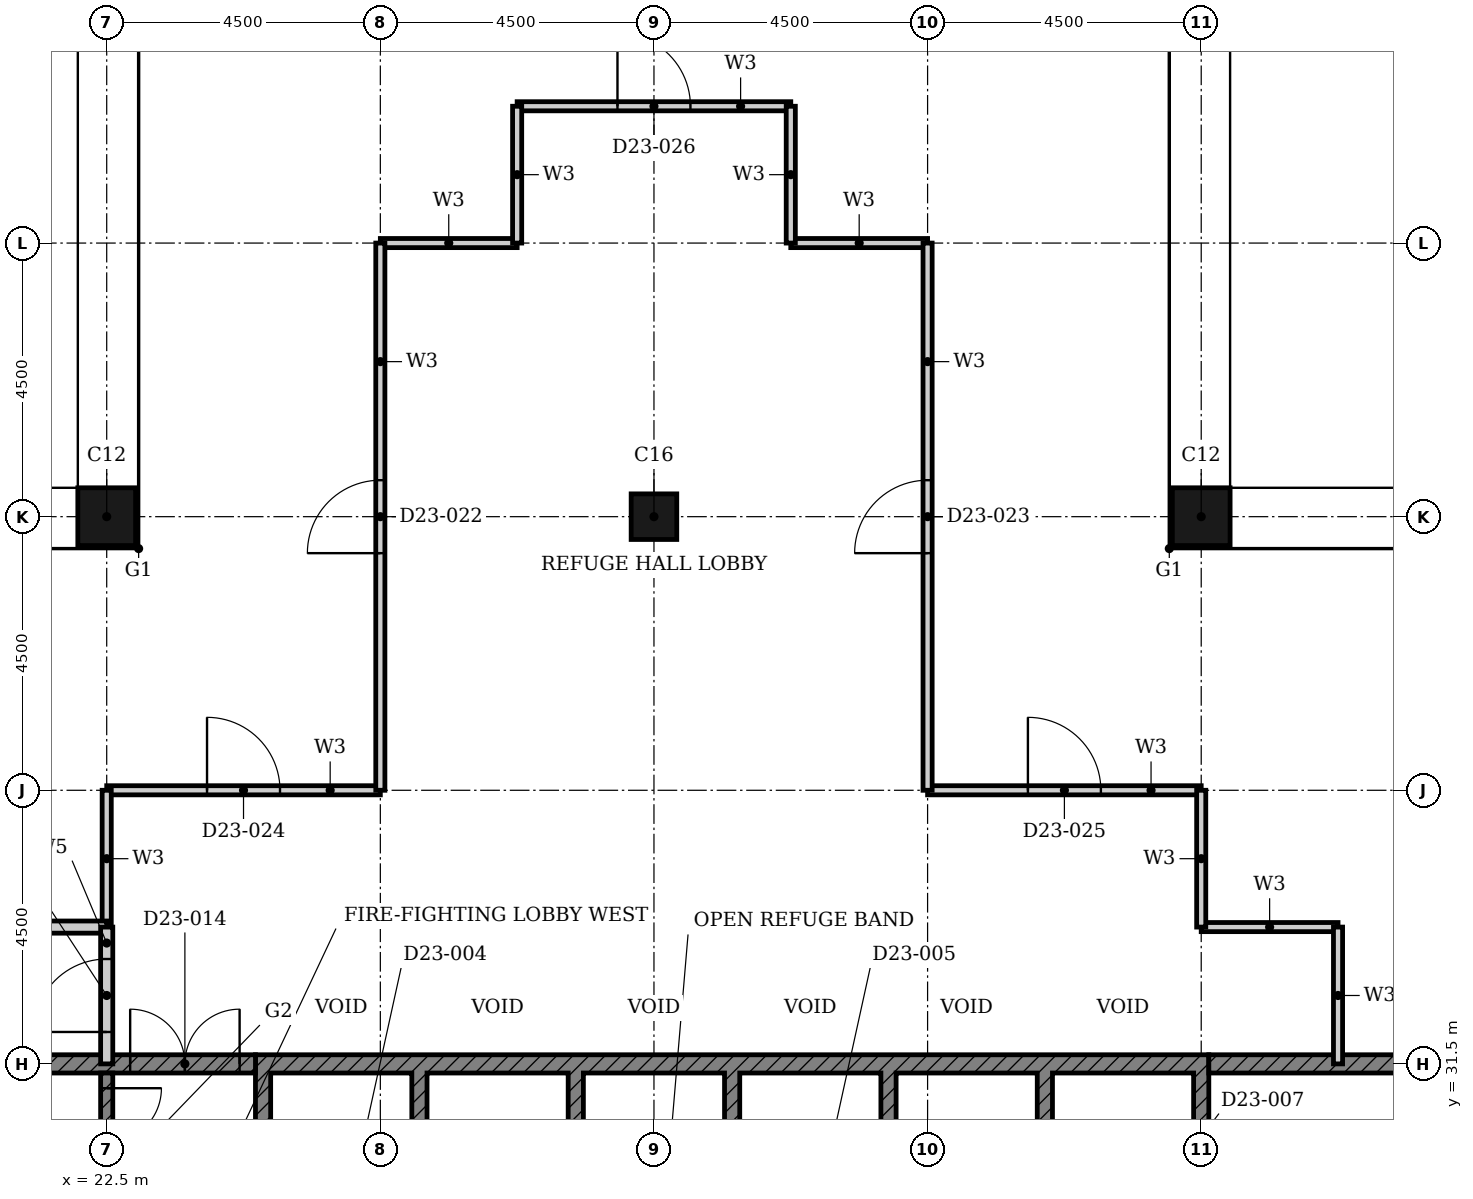
"""IFC4 building model, lengths in metres.
Left out: names, types, materials, properties, quantities, classifications, styles, units other than length and angle.
Written with IfcOpenShell. Run it as: python <this file> out.ifc"""

import sys

from ifc_helpers import new_model, si_unit, direction, frame, frame_2d, origin, origin_2d, place, context, subcontext, project, spatial, polyline, rectangle, hollow_rectangle, outline, extrude, element, fill, save


model = new_model("IFC4")
c1 = context("Model", 3, precision=1e-05, world=origin(), true_north=direction((0.0, 1.0)))
c2 = subcontext(c1, "Body", "Model", "MODEL_VIEW")
j1 = project(units=[si_unit("LENGTHUNIT", "METRE"), si_unit("PLANEANGLEUNIT", "RADIAN")], contexts=[c1])
p1 = place(None, origin())
s1 = spatial("IfcSite", under=j1, at=p1, CompositionType="ELEMENT")
p2 = place(p1, origin())
s2 = spatial("IfcBuilding", under=s1, at=p2, CompositionType="ELEMENT")
p3 = place(p2, frame((0.0, 0.0, 96.0)))
s3 = spatial("IfcBuildingStorey", under=s2, at=p3, CompositionType="ELEMENT", Elevation=96.0)
for number, where, z_axis, x_axis in (
    (1, (40.5, 40.5, 0.0), (0.0, 0.0, 1.0), (1.0, 0.0, 0.0)),
    (2, (22.5, 40.5, 0.0), (0.0, 0.0, 1.0), (1.0, 0.0, 0.0)),
):
    element("IfcColumn", number, at=place(p3, frame(where, z_axis=z_axis, x_axis=x_axis)), inside=s3, PredefinedType="COLUMN", context=c2, shape_type="SweptSolid", body=[
        extrude(hollow_rectangle(XDim=0.95, YDim=0.95, WallThickness=0.03, at=origin_2d()), origin(), (0.0, 0.0, 1.0), 4.8),
    ])
p4 = place(p3, frame((31.5, 40.5, 0.0), z_axis=(0.0, 0.0, 1.0), x_axis=(1.0, 0.0, 0.0)))
e3 = element("IfcColumn", 3, at=p4, inside=s3, PredefinedType="COLUMN", context=c2, shape_type="SweptSolid", body=[
    extrude(hollow_rectangle(XDim=0.75, YDim=0.75, WallThickness=0.024, at=origin_2d()), origin(), (0.0, 0.0, 1.0), 4.8),
])
p5 = place(p3, origin())
e4 = element("IfcWall", 4, at=p5, inside=s3, PredefinedType="SHEAR", context=c2, shape_type="SweptSolid", body=[
    extrude(outline(polyline([(24.947, 28.725), (25.197, 28.725), (25.197, 31.35), (27.518, 31.35), (27.518, 28.725), (27.768, 28.725), (27.768, 31.35), (30.089, 31.35), (30.089, 28.725), (30.339, 28.725), (30.339, 31.35), (32.661, 31.35), (32.661, 28.725), (32.911, 28.725), (32.911, 31.35), (35.232, 31.35), (35.232, 28.725), (35.482, 28.725), (35.482, 31.35), (37.803, 31.35), (37.803, 28.725), (38.053, 28.725), (38.053, 31.35), (40.375, 31.35), (40.375, 28.725), (40.625, 28.725), (40.625, 31.65), (24.947, 31.65), (24.947, 28.725)])), origin(), (0.0, 0.0, 1.0), 4.5),
])
p6 = place(p3, frame((18.15, 31.5, 0.0), z_axis=(0.0, 0.0, 1.0), x_axis=(1.0, 0.0, 0.0)))
e5 = element("IfcWall", 5, at=p6, inside=s3, PredefinedType="SHEAR", context=c2, shape_type="SweptSolid", body=[
    extrude(rectangle(XDim=6.797, YDim=0.3, at=frame_2d((3.398, 0.0))), origin(), (0.0, 0.0, 1.0), 4.5),
])
p7 = place(p6, frame((4.736, 0.0, 0.0)))
e6 = element("IfcOpeningElement", 6, at=p7, cuts=e5, PredefinedType="OPENING", context=c2, shape_type="SweptSolid", body=[
    extrude(rectangle(XDim=1.8, YDim=2.1, at=frame_2d((0.9, 1.05))), frame((0.0, 0.16, 0.0), z_axis=(0.0, -1.0, 0.0), x_axis=(1.0, 0.0, 0.0)), (0.0, 0.0, 1.0), 0.32),
])
p8 = place(p3, frame((40.625, 31.5, 0.0), z_axis=(0.0, 0.0, 1.0), x_axis=(1.0, 0.0, 0.0)))
e7 = element("IfcWall", 7, at=p8, inside=s3, PredefinedType="SHEAR", context=c2, shape_type="SweptSolid", body=[
    extrude(rectangle(XDim=4.225, YDim=0.3, at=frame_2d((2.113, 0.0))), origin(), (0.0, 0.0, 1.0), 4.5),
])
p9 = place(p3, frame((22.5, 31.35, 0.0), z_axis=(0.0, 0.0, 1.0), x_axis=(0.0, -1.0, 0.0)))
e8 = element("IfcWall", 8, at=p9, inside=s3, PredefinedType="SHEAR", context=c2, shape_type="SweptSolid", body=[
    extrude(rectangle(XDim=5.825, YDim=0.2, at=frame_2d((2.913, 0.0))), origin(), (0.0, 0.0, 1.0), 4.5),
])
p10 = place(p9, frame((0.25, 0.0, 0.0)))
e9 = element("IfcOpeningElement", 9, at=p10, cuts=e8, PredefinedType="OPENING", context=c2, shape_type="SweptSolid", body=[
    extrude(rectangle(XDim=1.8, YDim=2.1, at=frame_2d((0.9, 1.05))), frame((0.0, 0.11, 0.0), z_axis=(0.0, -1.0, 0.0), x_axis=(1.0, 0.0, 0.0)), (0.0, 0.0, 1.0), 0.22),
])
p11 = place(p3, frame((40.5, 33.75, 0.0), z_axis=(0.0, 0.0, 1.0), x_axis=(1.0, 0.0, 0.0)))
e10 = element("IfcWall", 10, at=p11, inside=s3, PredefinedType="PARTITIONING", context=c2, shape_type="SweptSolid", body=[
    extrude(rectangle(XDim=2.25, YDim=0.15, at=frame_2d((1.125, 0.0))), origin(), (0.0, 0.0, 1.0), 4.5),
])
p12 = place(p3, frame((22.5, 36.0, 0.0), z_axis=(0.0, 0.0, 1.0), x_axis=(1.0, 0.0, 0.0)))
e11 = element("IfcWall", 11, at=p12, inside=s3, PredefinedType="PARTITIONING", context=c2, shape_type="SweptSolid", body=[
    extrude(rectangle(XDim=4.5, YDim=0.15, at=frame_2d((2.25, 0.0))), origin(), (0.0, 0.0, 1.0), 4.5),
])
p13 = place(p12, frame((1.65, 0.0, 0.0)))
e12 = element("IfcOpeningElement", 12, at=p13, cuts=e11, PredefinedType="OPENING", context=c2, shape_type="SweptSolid", body=[
    extrude(rectangle(XDim=1.2, YDim=2.1, at=frame_2d((0.6, 1.05))), frame((0.0, 0.085, 0.0), z_axis=(0.0, -1.0, 0.0), x_axis=(1.0, 0.0, 0.0)), (0.0, 0.0, 1.0), 0.17),
])
p14 = place(p3, frame((36.0, 36.0, 0.0), z_axis=(0.0, 0.0, 1.0), x_axis=(1.0, 0.0, 0.0)))
e13 = element("IfcWall", 13, at=p14, inside=s3, PredefinedType="PARTITIONING", context=c2, shape_type="SweptSolid", body=[
    extrude(rectangle(XDim=4.5, YDim=0.15, at=frame_2d((2.25, 0.0))), origin(), (0.0, 0.0, 1.0), 4.5),
])
p15 = place(p14, frame((1.65, 0.0, 0.0)))
e14 = element("IfcOpeningElement", 14, at=p15, cuts=e13, PredefinedType="OPENING", context=c2, shape_type="SweptSolid", body=[
    extrude(rectangle(XDim=1.2, YDim=2.1, at=frame_2d((0.6, 1.05))), frame((0.0, 0.085, 0.0), z_axis=(0.0, -1.0, 0.0), x_axis=(1.0, 0.0, 0.0)), (0.0, 0.0, 1.0), 0.17),
])
for number, where, z_axis, x_axis in (
    (15, (27.0, 45.0, 0.0), (0.0, 0.0, 1.0), (1.0, 0.0, 0.0)),
    (16, (33.75, 45.0, 0.0), (0.0, 0.0, 1.0), (1.0, 0.0, 0.0)),
):
    element("IfcWall", number, at=place(p3, frame(where, z_axis=z_axis, x_axis=x_axis)), inside=s3, PredefinedType="PARTITIONING", context=c2, shape_type="SweptSolid", body=[
        extrude(rectangle(XDim=2.25, YDim=0.15, at=frame_2d((1.125, 0.0))), origin(), (0.0, 0.0, 1.0), 4.5),
    ])
p16 = place(p3, frame((29.25, 47.25, 0.0), z_axis=(0.0, 0.0, 1.0), x_axis=(1.0, 0.0, 0.0)))
e17 = element("IfcWall", 17, at=p16, inside=s3, PredefinedType="PARTITIONING", context=c2, shape_type="SweptSolid", body=[
    extrude(rectangle(XDim=4.5, YDim=0.15, at=frame_2d((2.25, 0.0))), origin(), (0.0, 0.0, 1.0), 4.5),
])
p17 = place(p16, frame((1.65, 0.0, 0.0)))
e18 = element("IfcOpeningElement", 18, at=p17, cuts=e17, PredefinedType="OPENING", context=c2, shape_type="SweptSolid", body=[
    extrude(rectangle(XDim=1.2, YDim=2.1, at=frame_2d((0.6, 1.05))), frame((0.0, 0.085, 0.0), z_axis=(0.0, -1.0, 0.0), x_axis=(1.0, 0.0, 0.0)), (0.0, 0.0, 1.0), 0.17),
])
p18 = place(p3, frame((22.5, 33.75, 0.0), z_axis=(0.0, 0.0, 1.0), x_axis=(0.0, 1.0, 0.0)))
e19 = element("IfcWall", 19, at=p18, inside=s3, PredefinedType="PARTITIONING", context=c2, shape_type="SweptSolid", body=[
    extrude(rectangle(XDim=2.25, YDim=0.15, at=frame_2d((1.125, 0.0))), origin(), (0.0, 0.0, 1.0), 4.5),
])
p19 = place(p3, frame((27.0, 36.0, 0.0), z_axis=(0.0, 0.0, 1.0), x_axis=(0.0, 1.0, 0.0)))
e20 = element("IfcWall", 20, at=p19, inside=s3, PredefinedType="PARTITIONING", context=c2, shape_type="SweptSolid", body=[
    extrude(rectangle(XDim=9.0, YDim=0.15, at=frame_2d((4.5, 0.0))), origin(), (0.0, 0.0, 1.0), 3.78),
])
p20 = place(p19, frame((3.9, 0.0, 0.0)))
e21 = element("IfcOpeningElement", 21, at=p20, cuts=e20, PredefinedType="OPENING", context=c2, shape_type="SweptSolid", body=[
    extrude(rectangle(XDim=1.2, YDim=2.1, at=frame_2d((0.6, 1.05))), frame((0.0, 0.085, 0.0), z_axis=(0.0, -1.0, 0.0), x_axis=(1.0, 0.0, 0.0)), (0.0, 0.0, 1.0), 0.17),
])
for number, where, z_axis, x_axis in (
    (22, (29.25, 45.0, 0.0), (0.0, 0.0, 1.0), (0.0, 1.0, 0.0)),
    (23, (33.75, 45.0, 0.0), (0.0, 0.0, 1.0), (0.0, 1.0, 0.0)),
):
    element("IfcWall", number, at=place(p3, frame(where, z_axis=z_axis, x_axis=x_axis)), inside=s3, PredefinedType="PARTITIONING", context=c2, shape_type="SweptSolid", body=[
        extrude(rectangle(XDim=2.25, YDim=0.15, at=frame_2d((1.125, 0.0))), origin(), (0.0, 0.0, 1.0), 4.5),
    ])
p21 = place(p3, frame((36.0, 36.0, 0.0), z_axis=(0.0, 0.0, 1.0), x_axis=(0.0, 1.0, 0.0)))
e24 = element("IfcWall", 24, at=p21, inside=s3, PredefinedType="PARTITIONING", context=c2, shape_type="SweptSolid", body=[
    extrude(rectangle(XDim=9.0, YDim=0.15, at=frame_2d((4.5, 0.0))), origin(), (0.0, 0.0, 1.0), 3.78),
])
p22 = place(p21, frame((3.9, 0.0, 0.0)))
e25 = element("IfcOpeningElement", 25, at=p22, cuts=e24, PredefinedType="OPENING", context=c2, shape_type="SweptSolid", body=[
    extrude(rectangle(XDim=1.2, YDim=2.1, at=frame_2d((0.6, 1.05))), frame((0.0, 0.085, 0.0), z_axis=(0.0, -1.0, 0.0), x_axis=(1.0, 0.0, 0.0)), (0.0, 0.0, 1.0), 0.17),
])
for number, where, z_axis, x_axis in (
    (26, (40.5, 33.75, 0.0), (0.0, 0.0, 1.0), (0.0, 1.0, 0.0)),
    (27, (42.75, 31.5, 0.0), (0.0, 0.0, 1.0), (0.0, 1.0, 0.0)),
):
    element("IfcWall", number, at=place(p3, frame(where, z_axis=z_axis, x_axis=x_axis)), inside=s3, PredefinedType="PARTITIONING", context=c2, shape_type="SweptSolid", body=[
        extrude(rectangle(XDim=2.25, YDim=0.15, at=frame_2d((1.125, 0.0))), origin(), (0.0, 0.0, 1.0), 4.5),
    ])
p23 = place(p3, frame((20.25, 33.75, 0.0), z_axis=(0.0, 0.0, 1.0), x_axis=(1.0, 0.0, 0.0)))
e28 = element("IfcWall", 28, at=p23, inside=s3, PredefinedType="PARTITIONING", context=c2, shape_type="SweptSolid", body=[
    extrude(rectangle(XDim=2.25, YDim=0.2, at=frame_2d((1.125, 0.0))), origin(), (0.0, 0.0, 1.0), 4.5),
])
p24 = place(p3, frame((22.5, 31.5, 0.0), z_axis=(0.0, 0.0, 1.0), x_axis=(0.0, 1.0, 0.0)))
e29 = element("IfcWall", 29, at=p24, inside=s3, PredefinedType="PARTITIONING", context=c2, shape_type="SweptSolid", body=[
    extrude(rectangle(XDim=2.25, YDim=0.2, at=frame_2d((1.125, 0.0))), origin(), (0.0, 0.0, 1.0), 4.5),
])
p25 = place(p24, frame((0.525, 0.0, 0.0)))
e30 = element("IfcOpeningElement", 30, at=p25, cuts=e29, PredefinedType="OPENING", context=c2, shape_type="SweptSolid", body=[
    extrude(rectangle(XDim=1.2, YDim=2.1, at=frame_2d((0.6, 1.05))), frame((0.0, 0.11, 0.0), z_axis=(0.0, -1.0, 0.0), x_axis=(1.0, 0.0, 0.0)), (0.0, 0.0, 1.0), 0.22),
])
p26 = place(p10, origin())
e31 = element("IfcDoor", 31, at=p26, inside=s3, OperationType="DOUBLE_DOOR_SINGLE_SWING", PredefinedType="DOOR", context=c2, shape_type="SweptSolid", body=[
    extrude(rectangle(XDim=1.8, YDim=2.1, at=frame_2d((0.9, 1.05))), frame((0.0, 0.025, 0.0), z_axis=(0.0, -1.0, 0.0), x_axis=(1.0, 0.0, 0.0)), (0.0, 0.0, 1.0), 0.05),
])
fill(e9, e31)
p27 = place(p7, origin())
e32 = element("IfcDoor", 32, at=p27, inside=s3, OperationType="DOUBLE_DOOR_SINGLE_SWING", PredefinedType="DOOR", context=c2, shape_type="SweptSolid", body=[
    extrude(rectangle(XDim=1.8, YDim=2.1, at=frame_2d((0.9, 1.05))), frame((0.0, 0.025, 0.0), z_axis=(0.0, -1.0, 0.0), x_axis=(1.0, 0.0, 0.0)), (0.0, 0.0, 1.0), 0.05),
])
fill(e6, e32)
p28 = place(p25, origin())
e33 = element("IfcDoor", 33, at=p28, inside=s3, OperationType="SINGLE_SWING_RIGHT", PredefinedType="DOOR", context=c2, shape_type="SweptSolid", body=[
    extrude(rectangle(XDim=1.2, YDim=2.1, at=frame_2d((0.6, 1.05))), frame((0.0, 0.025, 0.0), z_axis=(0.0, -1.0, 0.0), x_axis=(1.0, 0.0, 0.0)), (0.0, 0.0, 1.0), 0.05),
])
fill(e30, e33)
p29 = place(p20, origin())
e34 = element("IfcDoor", 34, at=p29, inside=s3, OperationType="SINGLE_SWING_RIGHT", PredefinedType="DOOR", context=c2, shape_type="SweptSolid", body=[
    extrude(rectangle(XDim=1.2, YDim=2.1, at=frame_2d((0.6, 1.05))), frame((0.0, 0.025, 0.0), z_axis=(0.0, -1.0, 0.0), x_axis=(1.0, 0.0, 0.0)), (0.0, 0.0, 1.0), 0.05),
])
fill(e21, e34)
p30 = place(p22, origin())
e35 = element("IfcDoor", 35, at=p30, inside=s3, OperationType="SINGLE_SWING_RIGHT", PredefinedType="DOOR", context=c2, shape_type="SweptSolid", body=[
    extrude(rectangle(XDim=1.2, YDim=2.1, at=frame_2d((0.6, 1.05))), frame((0.0, 0.025, 0.0), z_axis=(0.0, -1.0, 0.0), x_axis=(1.0, 0.0, 0.0)), (0.0, 0.0, 1.0), 0.05),
])
fill(e25, e35)
p31 = place(p13, origin())
e36 = element("IfcDoor", 36, at=p31, inside=s3, OperationType="SINGLE_SWING_RIGHT", PredefinedType="DOOR", context=c2, shape_type="SweptSolid", body=[
    extrude(rectangle(XDim=1.2, YDim=2.1, at=frame_2d((0.6, 1.05))), frame((0.0, 0.025, 0.0), z_axis=(0.0, -1.0, 0.0), x_axis=(1.0, 0.0, 0.0)), (0.0, 0.0, 1.0), 0.05),
])
fill(e12, e36)
p32 = place(p15, origin())
e37 = element("IfcDoor", 37, at=p32, inside=s3, OperationType="SINGLE_SWING_LEFT", PredefinedType="DOOR", context=c2, shape_type="SweptSolid", body=[
    extrude(rectangle(XDim=1.2, YDim=2.1, at=frame_2d((0.6, 1.05))), frame((0.0, 0.025, 0.0), z_axis=(0.0, -1.0, 0.0), x_axis=(1.0, 0.0, 0.0)), (0.0, 0.0, 1.0), 0.05),
])
fill(e14, e37)
p33 = place(p17, origin())
e38 = element("IfcDoor", 38, at=p33, inside=s3, OperationType="SINGLE_SWING_RIGHT", PredefinedType="DOOR", context=c2, shape_type="SweptSolid", body=[
    extrude(rectangle(XDim=1.2, YDim=2.1, at=frame_2d((0.6, 1.05))), frame((0.0, 0.025, 0.0), z_axis=(0.0, -1.0, 0.0), x_axis=(1.0, 0.0, 0.0)), (0.0, 0.0, 1.0), 0.05),
])
fill(e18, e38)
save(model, sys.argv[1])
